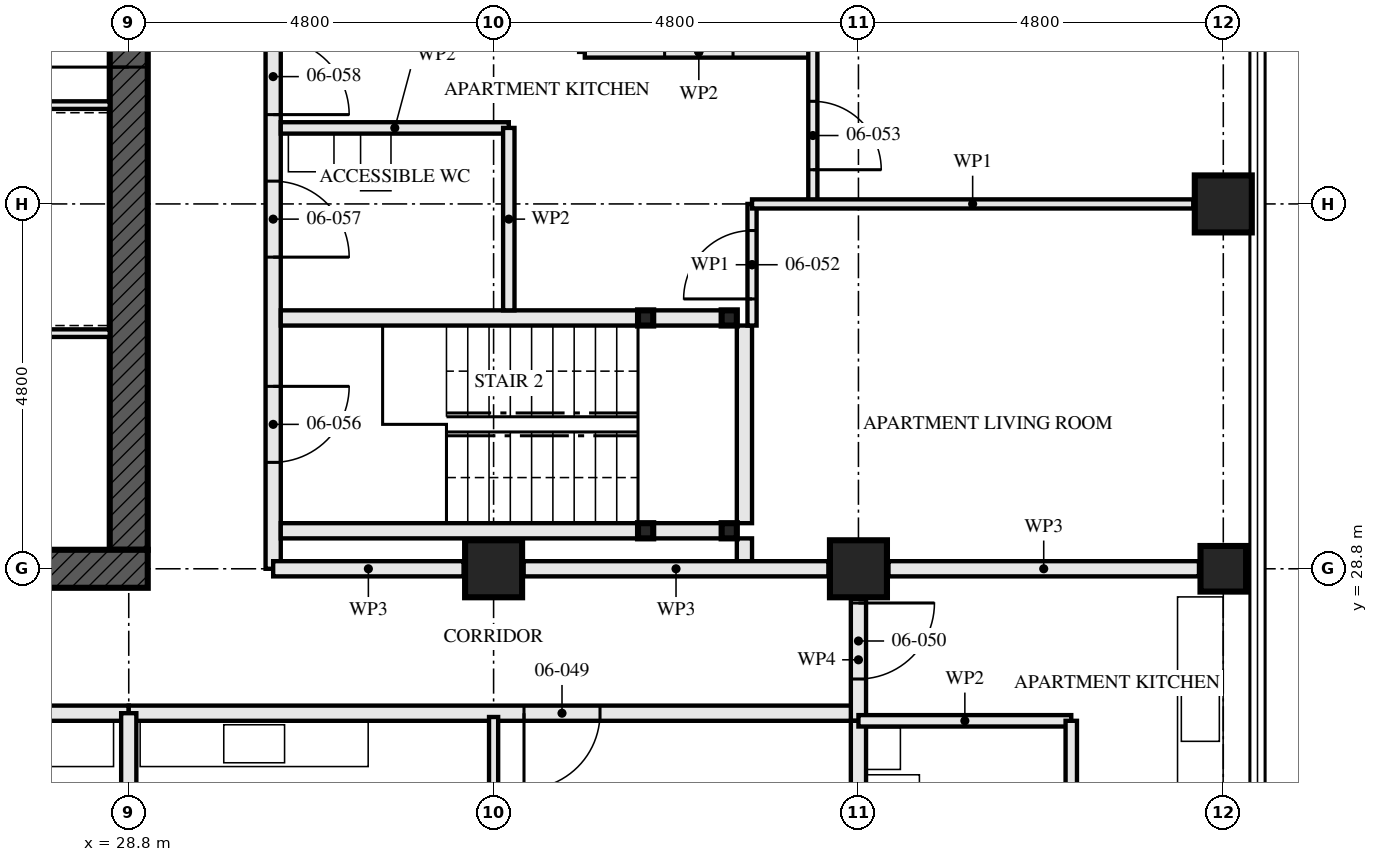
"""IFC4 building model, lengths in metres.
Left out: names, types, materials, properties, quantities, classifications, styles, units other than length and angle.
Written with IfcOpenShell. Run it as: python <this file> out.ifc"""

import sys

from ifc_helpers import new_model, si_unit, direction, frame, frame_2d, origin, origin_2d, place, context, subcontext, project, spatial, rectangle, hollow_rectangle, extrude, element, fill, save


model = new_model("IFC4")
c1 = context("Model", 3, precision=1e-05, world=origin(), true_north=direction((0.0, 1.0)))
c2 = subcontext(c1, "Body", "Model", "MODEL_VIEW")
j1 = project(units=[si_unit("LENGTHUNIT", "METRE"), si_unit("PLANEANGLEUNIT", "RADIAN")], contexts=[c1])
p1 = place(None, origin())
s1 = spatial("IfcSite", under=j1, at=p1, CompositionType="ELEMENT")
p2 = place(p1, origin())
s2 = spatial("IfcBuilding", under=s1, at=p2, CompositionType="ELEMENT")
p3 = place(p2, frame((0.0, 0.0, 27.0)))
s3 = spatial("IfcBuildingStorey", under=s2, at=p3, CompositionType="ELEMENT", Elevation=27.0)
for number, where, z_axis, x_axis in (
    (1, (33.6, 28.8, 0.0), (0.0, 0.0, 1.0), (0.0, 1.0, 0.0)),
    (2, (38.4, 28.8, 0.0), (0.0, 0.0, 1.0), (0.0, 1.0, 0.0)),
):
    element("IfcColumn", number, at=place(p3, frame(where, z_axis=z_axis, x_axis=x_axis)), inside=s3, PredefinedType="COLUMN", context=c2, shape_type="SweptSolid", body=[
        extrude(hollow_rectangle(XDim=0.75, YDim=0.75, WallThickness=0.08, at=origin_2d()), origin(), (0.0, 0.0, 1.0), 3.5),
    ])
p4 = place(p3, frame((43.2, 28.8, 0.0), z_axis=(0.0, 0.0, 1.0), x_axis=(0.0, 1.0, 0.0)))
e3 = element("IfcColumn", 3, at=p4, inside=s3, PredefinedType="COLUMN", context=c2, shape_type="SweptSolid", body=[
    extrude(hollow_rectangle(XDim=0.6, YDim=0.6, WallThickness=0.08, at=origin_2d()), origin(), (0.0, 0.0, 1.0), 3.5),
])
p5 = place(p3, frame((43.2, 33.6, 0.0), z_axis=(0.0, 0.0, 1.0), x_axis=(1.0, 0.0, 0.0)))
e4 = element("IfcColumn", 4, at=p5, inside=s3, PredefinedType="COLUMN", context=c2, shape_type="SweptSolid", body=[
    extrude(hollow_rectangle(XDim=0.75, YDim=0.75, WallThickness=0.08, at=origin_2d()), origin(), (0.0, 0.0, 1.0), 3.5),
])
p6 = place(p3, frame((14.15, 28.8, -0.17), z_axis=(0.0, 0.0, 1.0), x_axis=(1.0, 0.0, 0.0)))
e5 = element("IfcWall", 5, at=p6, inside=s3, PredefinedType="SHEAR", context=c2, shape_type="SweptSolid", body=[
    extrude(rectangle(XDim=14.9, YDim=0.5, at=frame_2d((7.45, 0.0))), origin(), (0.0, 0.0, 1.0), 3.5),
])
p7 = place(p6, frame((6.85, 0.0, 0.17)))
e6 = element("IfcOpeningElement", 6, at=p7, cuts=e5, PredefinedType="OPENING", context=c2, shape_type="SweptSolid", body=[
    extrude(rectangle(XDim=1.2, YDim=2.1, at=frame_2d((0.6, 1.05))), frame((0.0, 0.26, 0.0), z_axis=(0.0, -1.0, 0.0), x_axis=(1.0, 0.0, 0.0)), (0.0, 0.0, 1.0), 0.521),
])
p8 = place(p3, frame((28.8, 29.05, -0.17), z_axis=(0.0, 0.0, 1.0), x_axis=(0.0, 1.0, 0.0)))
e7 = element("IfcWall", 7, at=p8, inside=s3, PredefinedType="SHEAR", context=c2, shape_type="SweptSolid", body=[
    extrude(rectangle(XDim=13.9, YDim=0.5, at=frame_2d((6.95, 0.0))), origin(), (0.0, 0.0, 1.0), 3.5),
])
p9 = place(p8, frame((6.35, 0.0, 0.17)))
e8 = element("IfcOpeningElement", 8, at=p9, cuts=e7, PredefinedType="OPENING", context=c2, shape_type="SweptSolid", body=[
    extrude(rectangle(XDim=1.2, YDim=2.1, at=frame_2d((0.6, 1.05))), frame((0.0, 0.26, 0.0), z_axis=(0.0, -1.0, 0.0), x_axis=(1.0, 0.0, 0.0)), (0.0, 0.0, 1.0), 0.521),
])
for number, where, z_axis, x_axis in (
    (9, (36.7, 29.3, 0.0), (0.0, 0.0, 1.0), (1.0, 0.0, 0.0)),
    (10, (36.7, 32.1, 0.0), (0.0, 0.0, 1.0), (1.0, 0.0, 0.0)),
    (11, (35.6, 29.3, 0.0), (0.0, 0.0, 1.0), (1.0, 0.0, 0.0)),
    (12, (35.6, 32.1, 0.0), (0.0, 0.0, 1.0), (1.0, 0.0, 0.0)),
):
    element("IfcColumn", number, at=place(p3, frame(where, z_axis=z_axis, x_axis=x_axis)), inside=s3, PredefinedType="COLUMN", context=c2, shape_type="SweptSolid", body=[
        extrude(hollow_rectangle(XDim=0.2, YDim=0.2, WallThickness=0.008, at=origin_2d()), origin(), (0.0, 0.0, 1.0), 3.33),
    ])
p10 = place(p3, frame((14.4, 26.9, 0.0), z_axis=(0.0, 0.0, 1.0), x_axis=(1.0, 0.0, 0.0)))
e13 = element("IfcWall", 13, at=p10, inside=s3, PredefinedType="PARTITIONING", context=c2, shape_type="SweptSolid", body=[
    extrude(rectangle(XDim=14.4, YDim=0.2, at=frame_2d((7.2, 0.0))), origin(), (0.0, 0.0, 1.0), 2.55),
])
p11 = place(p10, frame((1.4, 0.0, 0.0)))
e14 = element("IfcOpeningElement", 14, at=p11, cuts=e13, PredefinedType="OPENING", context=c2, shape_type="SweptSolid", body=[
    extrude(rectangle(XDim=1.0, YDim=2.1, at=frame_2d((0.5, 1.05))), frame((0.0, 0.111, 0.0), z_axis=(0.0, -1.0, 0.0), x_axis=(1.0, 0.0, 0.0)), (0.0, 0.0, 1.0), 0.221),
])
p12 = place(p10, frame((5.2, 0.0, 0.0)))
e15 = element("IfcOpeningElement", 15, at=p12, cuts=e13, PredefinedType="OPENING", context=c2, shape_type="SweptSolid", body=[
    extrude(rectangle(XDim=1.0, YDim=2.1, at=frame_2d((0.5, 1.05))), frame((0.0, 0.111, 0.0), z_axis=(0.0, -1.0, 0.0), x_axis=(1.0, 0.0, 0.0)), (0.0, 0.0, 1.0), 0.221),
])
p13 = place(p10, frame((10.0, 0.0, 0.0)))
e16 = element("IfcOpeningElement", 16, at=p13, cuts=e13, PredefinedType="OPENING", context=c2, shape_type="SweptSolid", body=[
    extrude(rectangle(XDim=1.0, YDim=2.1, at=frame_2d((0.5, 1.05))), frame((0.0, 0.111, 0.0), z_axis=(0.0, -1.0, 0.0), x_axis=(1.0, 0.0, 0.0)), (0.0, 0.0, 1.0), 0.221),
])
p14 = place(p3, frame((33.6, 20.8, 0.0), z_axis=(0.0, 0.0, 1.0), x_axis=(0.0, 1.0, 0.0)))
e17 = element("IfcWall", 17, at=p14, inside=s3, PredefinedType="PARTITIONING", context=c2, shape_type="SweptSolid", body=[
    extrude(rectangle(XDim=6.05, YDim=0.12, at=frame_2d((3.025, 0.0))), origin(), (0.0, 0.0, 1.0), 2.55),
])
p15 = place(p14, frame((2.575, 0.0, 0.0)))
e18 = element("IfcOpeningElement", 18, at=p15, cuts=e17, PredefinedType="OPENING", context=c2, shape_type="SweptSolid", body=[
    extrude(rectangle(XDim=0.9, YDim=2.1, at=frame_2d((0.45, 1.05))), frame((0.0, 0.071, 0.0), z_axis=(0.0, -1.0, 0.0), x_axis=(1.0, 0.0, 0.0)), (0.0, 0.0, 1.0), 0.141),
])
p16 = place(p3, frame((38.4, 19.52, 0.0), z_axis=(0.0, 0.0, 1.0), x_axis=(0.0, 1.0, 0.0)))
e19 = element("IfcWall", 19, at=p16, inside=s3, PredefinedType="PARTITIONING", context=c2, shape_type="SweptSolid", body=[
    extrude(rectangle(XDim=7.28, YDim=0.2, at=frame_2d((3.64, 0.0))), origin(), (0.0, 0.0, 1.0), 2.55),
])
p17 = place(p3, frame((41.2, 23.8, 0.0), z_axis=(0.0, 0.0, 1.0), x_axis=(0.0, 1.0, 0.0)))
e20 = element("IfcWall", 20, at=p17, inside=s3, PredefinedType="PARTITIONING", context=c2, shape_type="SweptSolid", body=[
    extrude(rectangle(XDim=3.0, YDim=0.15, at=frame_2d((1.5, 0.0))), origin(), (0.0, 0.0, 1.0), 2.55),
])
p18 = place(p17, frame((1.05, 0.0, 0.0)))
e21 = element("IfcOpeningElement", 21, at=p18, cuts=e20, PredefinedType="OPENING", context=c2, shape_type="SweptSolid", body=[
    extrude(rectangle(XDim=0.9, YDim=2.1, at=frame_2d((0.45, 1.05))), frame((0.0, 0.085, 0.0), z_axis=(0.0, -1.0, 0.0), x_axis=(1.0, 0.0, 0.0)), (0.0, 0.0, 1.0), 0.171),
])
p19 = place(p3, frame((38.4, 26.8, 0.0), z_axis=(0.0, 0.0, 1.0), x_axis=(1.0, 0.0, 0.0)))
e22 = element("IfcWall", 22, at=p19, inside=s3, PredefinedType="PARTITIONING", context=c2, shape_type="SweptSolid", body=[
    extrude(rectangle(XDim=2.8, YDim=0.15, at=frame_2d((1.4, 0.0))), origin(), (0.0, 0.0, 1.0), 3.33),
])
p20 = place(p3, frame((28.8, 26.9, 0.0), z_axis=(0.0, 0.0, 1.0), x_axis=(1.0, 0.0, 0.0)))
e23 = element("IfcWall", 23, at=p20, inside=s3, PredefinedType="PARTITIONING", context=c2, shape_type="SweptSolid", body=[
    extrude(rectangle(XDim=9.6, YDim=0.2, at=frame_2d((4.8, 0.0))), origin(), (0.0, 0.0, 1.0), 3.33),
])
p21 = place(p20, frame((5.2, 0.0, 0.0)))
e24 = element("IfcOpeningElement", 24, at=p21, cuts=e23, PredefinedType="OPENING", context=c2, shape_type="SweptSolid", body=[
    extrude(rectangle(XDim=1.0, YDim=2.1, at=frame_2d((0.5, 1.05))), frame((0.0, 0.111, 0.0), z_axis=(0.0, -1.0, 0.0), x_axis=(1.0, 0.0, 0.0)), (0.0, 0.0, 1.0), 0.221),
])
p22 = place(p3, frame((38.4, 26.8, 0.0), z_axis=(0.0, 0.0, 1.0), x_axis=(0.0, 1.0, 0.0)))
e25 = element("IfcWall", 25, at=p22, inside=s3, PredefinedType="PARTITIONING", context=c2, shape_type="SweptSolid", body=[
    extrude(rectangle(XDim=1.605, YDim=0.2, at=frame_2d((0.802, 0.0))), origin(), (0.0, 0.0, 1.0), 3.33),
])
p23 = place(p22, frame((0.55, 0.0, 0.0)))
e26 = element("IfcOpeningElement", 26, at=p23, cuts=e25, PredefinedType="OPENING", context=c2, shape_type="SweptSolid", body=[
    extrude(rectangle(XDim=1.0, YDim=2.1, at=frame_2d((0.5, 1.05))), frame((0.0, 0.111, 0.0), z_axis=(0.0, -1.0, 0.0), x_axis=(1.0, 0.0, 0.0)), (0.0, 0.0, 1.0), 0.221),
])
p24 = place(p3, frame((36.6, 29.3, 0.0), z_axis=(0.0, 0.0, 1.0), x_axis=(-1.0, 0.0, 0.0)))
e27 = element("IfcWall", 27, at=p24, inside=s3, PredefinedType="SOLIDWALL", context=c2, shape_type="SweptSolid", body=[
    extrude(rectangle(XDim=0.9, YDim=0.2, at=frame_2d((0.45, 0.0))), origin(), (0.0, 0.0, 1.0), 2.99),
])
p25 = place(p3, frame((35.5, 29.3, 0.0), z_axis=(0.0, 0.0, 1.0), x_axis=(-1.0, 0.0, 0.0)))
e28 = element("IfcWall", 28, at=p25, inside=s3, PredefinedType="SOLIDWALL", context=c2, shape_type="SweptSolid", body=[
    extrude(rectangle(XDim=4.7, YDim=0.2, at=frame_2d((2.35, 0.0))), origin(), (0.0, 0.0, 1.0), 2.99),
])
p26 = place(p3, frame((36.6, 32.1, 0.0), z_axis=(0.0, 0.0, 1.0), x_axis=(-1.0, 0.0, 0.0)))
e29 = element("IfcWall", 29, at=p26, inside=s3, PredefinedType="SOLIDWALL", context=c2, shape_type="SweptSolid", body=[
    extrude(rectangle(XDim=0.9, YDim=0.2, at=frame_2d((0.45, 0.0))), origin(), (0.0, 0.0, 1.0), 2.99),
])
p27 = place(p3, frame((35.5, 32.1, 0.0), z_axis=(0.0, 0.0, 1.0), x_axis=(-1.0, 0.0, 0.0)))
e30 = element("IfcWall", 30, at=p27, inside=s3, PredefinedType="SOLIDWALL", context=c2, shape_type="SweptSolid", body=[
    extrude(rectangle(XDim=4.7, YDim=0.2, at=frame_2d((2.35, 0.0))), origin(), (0.0, 0.0, 1.0), 2.99),
])
p28 = place(p3, frame((36.9, 28.9, 0.0), z_axis=(0.0, 0.0, 1.0), x_axis=(0.0, 1.0, 0.0)))
e31 = element("IfcWall", 31, at=p28, inside=s3, PredefinedType="SOLIDWALL", context=c2, shape_type="SweptSolid", body=[
    extrude(rectangle(XDim=0.3, YDim=0.2, at=frame_2d((0.15, 0.0))), origin(), (0.0, 0.0, 1.0), 3.33),
])
p29 = place(p3, frame((36.9, 29.4, 0.0), z_axis=(0.0, 0.0, 1.0), x_axis=(0.0, 1.0, 0.0)))
e32 = element("IfcWall", 32, at=p29, inside=s3, PredefinedType="SOLIDWALL", context=c2, shape_type="SweptSolid", body=[
    extrude(rectangle(XDim=2.6, YDim=0.2, at=frame_2d((1.3, 0.0))), origin(), (0.0, 0.0, 1.0), 3.33),
])
p30 = place(p3, frame((33.8, 32.2, 0.0), z_axis=(0.0, 0.0, 1.0), x_axis=(0.0, 1.0, 0.0)))
e33 = element("IfcWall", 33, at=p30, inside=s3, PredefinedType="PARTITIONING", context=c2, shape_type="SweptSolid", body=[
    extrude(rectangle(XDim=2.4, YDim=0.15, at=frame_2d((1.2, 0.0))), origin(), (0.0, 0.0, 1.0), 2.55),
])
p31 = place(p3, frame((33.8, 34.6, 0.0), z_axis=(0.0, 0.0, 1.0), x_axis=(-1.0, 0.0, 0.0)))
e34 = element("IfcWall", 34, at=p31, inside=s3, PredefinedType="PARTITIONING", context=c2, shape_type="SweptSolid", body=[
    extrude(rectangle(XDim=3.0, YDim=0.15, at=frame_2d((1.5, 0.0))), origin(), (0.0, 0.0, 1.0), 3.33),
])
p32 = place(p3, frame((37.8, 35.6, 0.0), z_axis=(0.0, 0.0, 1.0), x_axis=(-1.0, 0.0, 0.0)))
e35 = element("IfcWall", 35, at=p32, inside=s3, PredefinedType="PARTITIONING", context=c2, shape_type="SweptSolid", body=[
    extrude(rectangle(XDim=3.0, YDim=0.15, at=frame_2d((1.5, 0.0))), origin(), (0.0, 0.0, 1.0), 3.33),
])
p33 = place(p32, frame((1.05, 0.0, 0.0)))
e36 = element("IfcOpeningElement", 36, at=p33, cuts=e35, PredefinedType="OPENING", context=c2, shape_type="SweptSolid", body=[
    extrude(rectangle(XDim=0.9, YDim=2.1, at=frame_2d((0.45, 1.05))), frame((0.0, 0.085, 0.0), z_axis=(0.0, -1.0, 0.0), x_axis=(1.0, 0.0, 0.0)), (0.0, 0.0, 1.0), 0.171),
])
p34 = place(p3, frame((37.0, 32.0, 0.0), z_axis=(0.0, 0.0, 1.0), x_axis=(0.0, 1.0, 0.0)))
e37 = element("IfcWall", 37, at=p34, inside=s3, PredefinedType="PARTITIONING", context=c2, shape_type="SweptSolid", body=[
    extrude(rectangle(XDim=1.6, YDim=0.12, at=frame_2d((0.8, 0.0))), origin(), (0.0, 0.0, 1.0), 3.33),
])
p35 = place(p34, frame((0.35, 0.0, 0.0)))
e38 = element("IfcOpeningElement", 38, at=p35, cuts=e37, PredefinedType="OPENING", context=c2, shape_type="SweptSolid", body=[
    extrude(rectangle(XDim=0.9, YDim=2.1, at=frame_2d((0.45, 1.05))), frame((0.0, 0.071, 0.0), z_axis=(0.0, -1.0, 0.0), x_axis=(1.0, 0.0, 0.0)), (0.0, 0.0, 1.0), 0.141),
])
p36 = place(p3, frame((37.8, 33.6, 0.0), z_axis=(0.0, 0.0, 1.0), x_axis=(0.0, 1.0, 0.0)))
e39 = element("IfcWall", 39, at=p36, inside=s3, PredefinedType="PARTITIONING", context=c2, shape_type="SweptSolid", body=[
    extrude(rectangle(XDim=4.8, YDim=0.12, at=frame_2d((2.4, 0.0))), origin(), (0.0, 0.0, 1.0), 3.33),
])
p37 = place(p36, frame((0.45, 0.0, 0.0)))
e40 = element("IfcOpeningElement", 40, at=p37, cuts=e39, PredefinedType="OPENING", context=c2, shape_type="SweptSolid", body=[
    extrude(rectangle(XDim=0.9, YDim=2.1, at=frame_2d((0.45, 1.05))), frame((0.0, 0.071, 0.0), z_axis=(0.0, -1.0, 0.0), x_axis=(1.0, 0.0, 0.0)), (0.0, 0.0, 1.0), 0.141),
])
p38 = place(p3, frame((42.805, 33.6, 0.0), z_axis=(0.0, 0.0, 1.0), x_axis=(-1.0, 0.0, 0.0)))
e41 = element("IfcWall", 41, at=p38, inside=s3, PredefinedType="PARTITIONING", context=c2, shape_type="SweptSolid", body=[
    extrude(rectangle(XDim=5.805, YDim=0.12, at=frame_2d((2.902, 0.0))), origin(), (0.0, 0.0, 1.0), 2.55),
])
p39 = place(p3, frame((30.7, 28.8, 0.0), z_axis=(0.0, 0.0, 1.0), x_axis=(0.0, 1.0, 0.0)))
e42 = element("IfcWall", 42, at=p39, inside=s3, PredefinedType="PARTITIONING", context=c2, shape_type="SweptSolid", body=[
    extrude(rectangle(XDim=14.4, YDim=0.2, at=frame_2d((7.2, 0.0))), origin(), (0.0, 0.0, 1.0), 2.55),
])
p40 = place(p39, frame((1.4, 0.0, 0.0)))
e43 = element("IfcOpeningElement", 43, at=p40, cuts=e42, PredefinedType="OPENING", context=c2, shape_type="SweptSolid", body=[
    extrude(rectangle(XDim=1.0, YDim=2.1, at=frame_2d((0.5, 1.05))), frame((0.0, 0.111, 0.0), z_axis=(0.0, -1.0, 0.0), x_axis=(1.0, 0.0, 0.0)), (0.0, 0.0, 1.0), 0.221),
])
p41 = place(p39, frame((4.1, 0.0, 0.0)))
e44 = element("IfcOpeningElement", 44, at=p41, cuts=e42, PredefinedType="OPENING", context=c2, shape_type="SweptSolid", body=[
    extrude(rectangle(XDim=1.0, YDim=2.1, at=frame_2d((0.5, 1.05))), frame((0.0, 0.111, 0.0), z_axis=(0.0, -1.0, 0.0), x_axis=(1.0, 0.0, 0.0)), (0.0, 0.0, 1.0), 0.221),
])
p42 = place(p39, frame((5.975, 0.0, 0.0)))
e45 = element("IfcOpeningElement", 45, at=p42, cuts=e42, PredefinedType="OPENING", context=c2, shape_type="SweptSolid", body=[
    extrude(rectangle(XDim=1.0, YDim=2.1, at=frame_2d((0.5, 1.05))), frame((0.0, 0.111, 0.0), z_axis=(0.0, -1.0, 0.0), x_axis=(1.0, 0.0, 0.0)), (0.0, 0.0, 1.0), 0.221),
])
p43 = place(p39, frame((10.0, 0.0, 0.0)))
e46 = element("IfcOpeningElement", 46, at=p43, cuts=e42, PredefinedType="OPENING", context=c2, shape_type="SweptSolid", body=[
    extrude(rectangle(XDim=1.0, YDim=2.1, at=frame_2d((0.5, 1.05))), frame((0.0, 0.111, 0.0), z_axis=(0.0, -1.0, 0.0), x_axis=(1.0, 0.0, 0.0)), (0.0, 0.0, 1.0), 0.221),
])
p44 = place(p3, frame((23.05, 34.9, 0.0), z_axis=(0.0, 0.0, 1.0), x_axis=(1.0, 0.0, 0.0)))
e47 = element("IfcWall", 47, at=p44, inside=s3, PredefinedType="SOLIDWALL", context=c2, shape_type="SweptSolid", body=[
    extrude(rectangle(XDim=5.5, YDim=0.1, at=frame_2d((2.75, 0.0))), origin(), (0.0, 0.0, 1.0), 3.33),
])
p45 = place(p3, frame((23.15, 31.9, 0.0), z_axis=(0.0, 0.0, 1.0), x_axis=(1.0, 0.0, 0.0)))
e48 = element("IfcWall", 48, at=p45, inside=s3, PredefinedType="SOLIDWALL", context=c2, shape_type="SweptSolid", body=[
    extrude(rectangle(XDim=5.4, YDim=0.1, at=frame_2d((2.7, 0.0))), origin(), (0.0, 0.0, 1.0), 3.33),
])
p46 = place(p3, frame((28.8, 24.395, 0.0), z_axis=(0.0, 0.0, 1.0), x_axis=(0.0, 1.0, 0.0)))
e49 = element("IfcWall", 49, at=p46, inside=s3, PredefinedType="PARTITIONING", context=c2, shape_type="SweptSolid", body=[
    extrude(rectangle(XDim=2.505, YDim=0.2, at=frame_2d((1.252, 0.0))), origin(), (0.0, 0.0, 1.0), 2.32),
])
p47 = place(p3, frame((42.88, 28.8, 0.0), z_axis=(0.0, 0.0, 1.0), x_axis=(-1.0, 0.0, 0.0)))
e50 = element("IfcWall", 50, at=p47, inside=s3, PredefinedType="PARTITIONING", context=c2, shape_type="SweptSolid", body=[
    extrude(rectangle(XDim=4.085, YDim=0.2, at=frame_2d((2.042, 0.0))), origin(), (0.0, 0.0, 1.0), 2.32),
])
p48 = place(p3, frame((38.005, 28.8, 0.0), z_axis=(0.0, 0.0, 1.0), x_axis=(-1.0, 0.0, 0.0)))
e51 = element("IfcWall", 51, at=p48, inside=s3, PredefinedType="PARTITIONING", context=c2, shape_type="SweptSolid", body=[
    extrude(rectangle(XDim=4.01, YDim=0.2, at=frame_2d((2.005, 0.0))), origin(), (0.0, 0.0, 1.0), 2.32),
])
p49 = place(p3, frame((33.205, 28.8, 0.0), z_axis=(0.0, 0.0, 1.0), x_axis=(-1.0, 0.0, 0.0)))
e52 = element("IfcWall", 52, at=p49, inside=s3, PredefinedType="PARTITIONING", context=c2, shape_type="SweptSolid", body=[
    extrude(rectangle(XDim=2.505, YDim=0.2, at=frame_2d((1.252, 0.0))), origin(), (0.0, 0.0, 1.0), 2.32),
])
p50 = place(p21, frame((1.0, 0.0, 0.0), z_axis=(0.0, 0.0, 1.0), x_axis=(-1.0, 0.0, 0.0)))
e53 = element("IfcDoor", 53, at=p50, inside=s3, OperationType="SINGLE_SWING_LEFT", PredefinedType="DOOR", context=c2, shape_type="SweptSolid", body=[
    extrude(rectangle(XDim=1.0, YDim=2.1, at=frame_2d((0.5, 1.05))), frame((0.0, 0.027, 0.0), z_axis=(0.0, -1.0, 0.0), x_axis=(1.0, 0.0, 0.0)), (0.0, 0.0, 1.0), 0.054),
])
fill(e24, e53)
p51 = place(p23, frame((1.0, 0.0, 0.0), z_axis=(0.0, 0.0, 1.0), x_axis=(-1.0, 0.0, 0.0)))
e54 = element("IfcDoor", 54, at=p51, inside=s3, OperationType="SINGLE_SWING_RIGHT", PredefinedType="DOOR", context=c2, shape_type="SweptSolid", body=[
    extrude(rectangle(XDim=1.0, YDim=2.1, at=frame_2d((0.5, 1.05))), frame((0.0, 0.027, 0.0), z_axis=(0.0, -1.0, 0.0), x_axis=(1.0, 0.0, 0.0)), (0.0, 0.0, 1.0), 0.054),
])
fill(e26, e54)
p52 = place(p33, frame((0.9, 0.0, 0.0), z_axis=(0.0, 0.0, 1.0), x_axis=(-1.0, 0.0, 0.0)))
e55 = element("IfcDoor", 55, at=p52, inside=s3, OperationType="SINGLE_SWING_LEFT", PredefinedType="DOOR", context=c2, shape_type="SweptSolid", body=[
    extrude(rectangle(XDim=0.9, YDim=2.1, at=frame_2d((0.45, 1.05))), frame((0.0, 0.022, 0.0), z_axis=(0.0, -1.0, 0.0), x_axis=(1.0, 0.0, 0.0)), (0.0, 0.0, 1.0), 0.044),
])
fill(e36, e55)
p53 = place(p35, origin())
e56 = element("IfcDoor", 56, at=p53, inside=s3, OperationType="SINGLE_SWING_RIGHT", PredefinedType="DOOR", context=c2, shape_type="SweptSolid", body=[
    extrude(rectangle(XDim=0.9, YDim=2.1, at=frame_2d((0.45, 1.05))), frame((0.0, 0.022, 0.0), z_axis=(0.0, -1.0, 0.0), x_axis=(1.0, 0.0, 0.0)), (0.0, 0.0, 1.0), 0.044),
])
fill(e38, e56)
p54 = place(p37, frame((0.9, 0.0, 0.0), z_axis=(0.0, 0.0, 1.0), x_axis=(-1.0, 0.0, 0.0)))
e57 = element("IfcDoor", 57, at=p54, inside=s3, OperationType="SINGLE_SWING_LEFT", PredefinedType="DOOR", context=c2, shape_type="SweptSolid", body=[
    extrude(rectangle(XDim=0.9, YDim=2.1, at=frame_2d((0.45, 1.05))), frame((0.0, 0.022, 0.0), z_axis=(0.0, -1.0, 0.0), x_axis=(1.0, 0.0, 0.0)), (0.0, 0.0, 1.0), 0.044),
])
fill(e40, e57)
p55 = place(p40, frame((1.0, 0.0, 0.0), z_axis=(0.0, 0.0, 1.0), x_axis=(-1.0, 0.0, 0.0)))
e58 = element("IfcDoor", 58, at=p55, inside=s3, OperationType="SINGLE_SWING_RIGHT", PredefinedType="DOOR", context=c2, shape_type="SweptSolid", body=[
    extrude(rectangle(XDim=1.0, YDim=2.1, at=frame_2d((0.5, 1.05))), frame((0.0, 0.032, 0.0), z_axis=(0.0, -1.0, 0.0), x_axis=(1.0, 0.0, 0.0)), (0.0, 0.0, 1.0), 0.064),
])
fill(e43, e58)
p56 = place(p41, frame((1.0, 0.0, 0.0), z_axis=(0.0, 0.0, 1.0), x_axis=(-1.0, 0.0, 0.0)))
e59 = element("IfcDoor", 59, at=p56, inside=s3, OperationType="SINGLE_SWING_LEFT", PredefinedType="DOOR", context=c2, shape_type="SweptSolid", body=[
    extrude(rectangle(XDim=1.0, YDim=2.1, at=frame_2d((0.5, 1.05))), frame((0.0, 0.027, 0.0), z_axis=(0.0, -1.0, 0.0), x_axis=(1.0, 0.0, 0.0)), (0.0, 0.0, 1.0), 0.054),
])
fill(e44, e59)
p57 = place(p42, frame((1.0, 0.0, 0.0), z_axis=(0.0, 0.0, 1.0), x_axis=(-1.0, 0.0, 0.0)))
e60 = element("IfcDoor", 60, at=p57, inside=s3, OperationType="SINGLE_SWING_LEFT", PredefinedType="DOOR", context=c2, shape_type="SweptSolid", body=[
    extrude(rectangle(XDim=1.0, YDim=2.1, at=frame_2d((0.5, 1.05))), frame((0.0, 0.027, 0.0), z_axis=(0.0, -1.0, 0.0), x_axis=(1.0, 0.0, 0.0)), (0.0, 0.0, 1.0), 0.054),
])
fill(e45, e60)
p58 = place(p9, origin())
e61 = element("IfcDoor", 61, at=p58, inside=s3, OperationType="SINGLE_SWING_LEFT", PredefinedType="DOOR", context=c2, shape_type="SweptSolid", body=[
    extrude(rectangle(XDim=1.2, YDim=2.1, at=frame_2d((0.6, 1.05))), frame((0.0, 0.027, 0.0), z_axis=(0.0, -1.0, 0.0), x_axis=(1.0, 0.0, 0.0)), (0.0, 0.0, 1.0), 0.054),
])
fill(e8, e61)
save(model, sys.argv[1])
